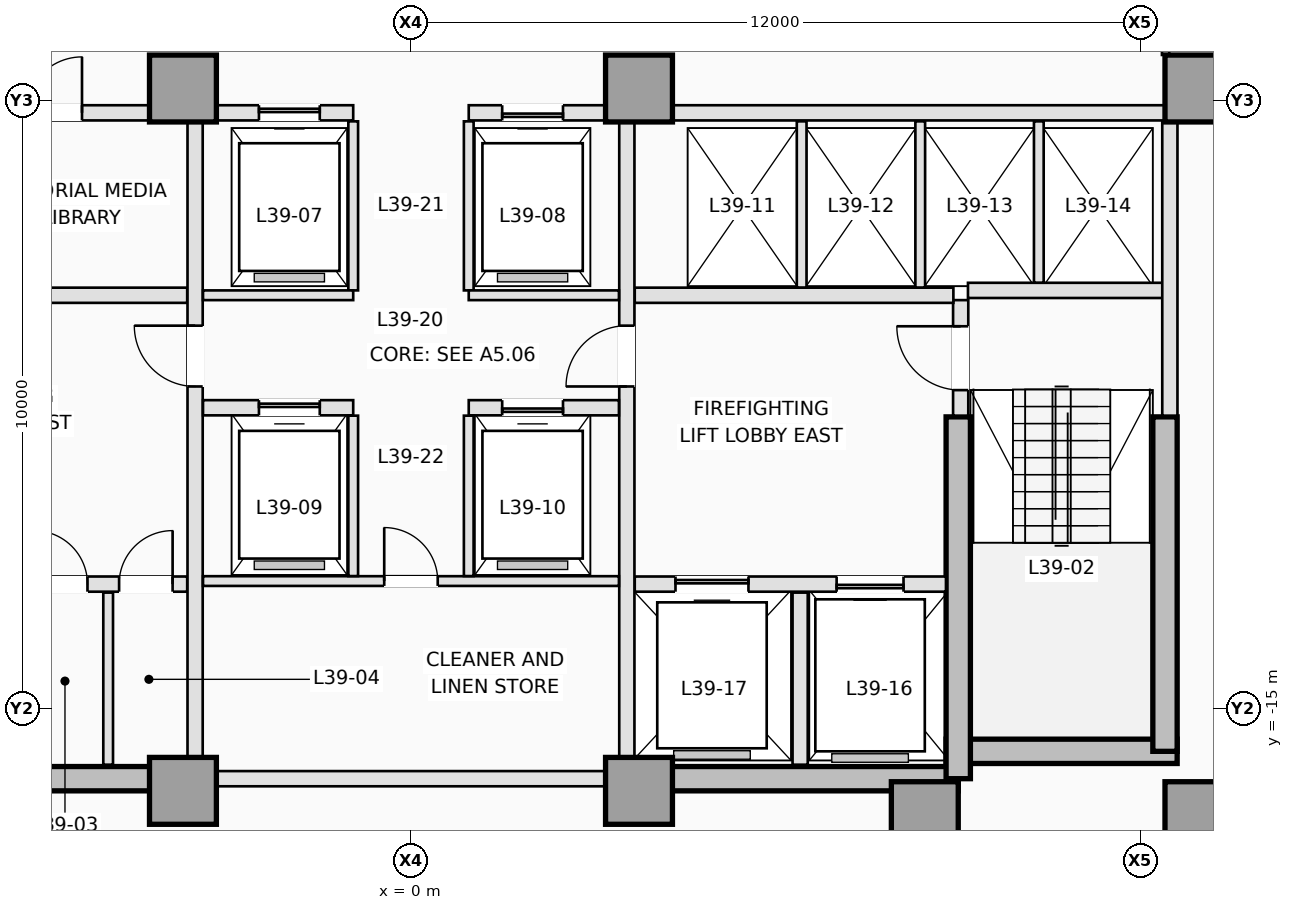
"""IFC4 building model, lengths in metres.
Left out: names, types, materials, properties, quantities, classifications, styles, units other than length and angle.
Written with IfcOpenShell. Run it as: python <this file> out.ifc"""

import sys

from ifc_helpers import new_model, si_unit, direction, frame, frame_2d, origin, origin_2d, place, context, subcontext, project, spatial, rectangle, extrude, element, fill, save


model = new_model("IFC4")
c1 = context("Model", 3, precision=1e-05, world=origin(), true_north=direction((0.0, 1.0)))
c2 = subcontext(c1, "Body", "Model", "MODEL_VIEW")
j1 = project(units=[si_unit("LENGTHUNIT", "METRE"), si_unit("PLANEANGLEUNIT", "RADIAN")], contexts=[c1])
p1 = place(None, origin())
s1 = spatial("IfcSite", under=j1, at=p1, CompositionType="ELEMENT")
p2 = place(p1, origin())
s2 = spatial("IfcBuilding", under=s1, at=p2, CompositionType="ELEMENT")
p3 = place(p2, frame((0.0, 0.0, 144.0)))
s3 = spatial("IfcBuildingStorey", under=s2, at=p3, CompositionType="ELEMENT", Elevation=144.0)
for number, where, z_axis, x_axis in (
    (1, (-9.0, -16.15, 0.0), (0.0, 0.0, 1.0), (1.0, 0.0, 0.0)),
    (2, (3.75, -16.15, 0.0), (0.0, 0.0, 1.0), (1.0, 0.0, 0.0)),
):
    element("IfcWall", number, at=place(p3, frame(where, z_axis=z_axis, x_axis=x_axis)), inside=s3, PredefinedType="SHEAR", context=c2, shape_type="SweptSolid", body=[
        extrude(rectangle(XDim=5.25, YDim=0.4, at=frame_2d((2.625, 0.0))), origin(), (0.0, 0.0, 1.0), 3.5),
    ])
p4 = place(p3, frame((8.8, -15.7, 0.0), z_axis=(0.0, 0.0, 1.0), x_axis=(1.0, 0.0, 0.0)))
e3 = element("IfcWall", 3, at=p4, inside=s3, PredefinedType="SHEAR", context=c2, shape_type="SweptSolid", body=[
    extrude(rectangle(XDim=3.8, YDim=0.4, at=frame_2d((1.9, 0.0))), origin(), (0.0, 0.0, 1.0), 3.5),
])
p5 = place(p3, frame((12.4, -15.7, 0.0), z_axis=(0.0, 0.0, 1.0), x_axis=(0.0, 1.0, 0.0)))
e4 = element("IfcWall", 4, at=p5, inside=s3, PredefinedType="SHEAR", context=c2, shape_type="SweptSolid", body=[
    extrude(rectangle(XDim=5.5, YDim=0.4, at=frame_2d((2.75, 0.0))), origin(), (0.0, 0.0, 1.0), 3.5),
])
p6 = place(p3, frame((9.0, -16.15, 0.0), z_axis=(0.0, 0.0, 1.0), x_axis=(0.0, 1.0, 0.0)))
e5 = element("IfcWall", 5, at=p6, inside=s3, PredefinedType="SHEAR", context=c2, shape_type="SweptSolid", body=[
    extrude(rectangle(XDim=5.95, YDim=0.4, at=frame_2d((2.975, 0.0))), origin(), (0.0, 0.0, 1.0), 3.5),
])
for number, where, z_axis, x_axis in (
    (6, (-3.75, -16.35, 0.0), (0.0, 0.0, 1.0), (1.0, 0.0, 0.0)),
    (7, (3.75, -16.35, 0.0), (0.0, 0.0, 1.0), (1.0, 0.0, 0.0)),
    (8, (8.45, -16.75, 0.0), (0.0, 0.0, 1.0), (1.0, 0.0, 0.0)),
    (9, (12.95, -16.75, 0.0), (0.0, 0.0, 1.0), (1.0, 0.0, 0.0)),
    (10, (-3.75, -4.8, 0.0), (0.0, 0.0, 1.0), (1.0, 0.0, 0.0)),
    (11, (3.75, -4.8, 0.0), (0.0, 0.0, 1.0), (1.0, 0.0, 0.0)),
    (12, (12.95, -4.8, 0.0), (0.0, 0.0, 1.0), (1.0, 0.0, 0.0)),
):
    element("IfcColumn", number, at=place(p3, frame(where, z_axis=z_axis, x_axis=x_axis)), inside=s3, PredefinedType="COLUMN", context=c2, shape_type="SweptSolid", body=[
        extrude(rectangle(XDim=1.1, YDim=1.1, at=origin_2d()), origin(), (0.0, 0.0, 1.0), 3.5),
    ])
p7 = place(p3, frame((9.04, -10.18, 0.0), z_axis=(0.0, 0.0, 1.0), x_axis=(0.0, 1.0, 0.0)))
e13 = element("IfcWall", 13, at=p7, inside=s3, PredefinedType="PARTITIONING", context=c2, shape_type="SweptSolid", body=[
    extrude(rectangle(XDim=1.9, YDim=0.25, at=frame_2d((0.95, 0.0))), origin(), (0.0, 0.0, 1.0), 3.25),
])
p8 = place(p7, frame((0.42, 0.0, 0.0)))
e14 = element("IfcOpeningElement", 14, at=p8, cuts=e13, PredefinedType="OPENING", context=c2, shape_type="SweptSolid", body=[
    extrude(rectangle(XDim=1.05, YDim=2.15, at=frame_2d((0.525, 1.075))), frame((0.0, 0.135, 0.0), z_axis=(0.0, -1.0, 0.0), x_axis=(1.0, 0.0, 0.0)), (0.0, 0.0, 1.0), 0.27),
])
p9 = place(p3, frame((9.16, -8.12, 0.0), z_axis=(0.0, 0.0, 1.0), x_axis=(1.0, 0.0, 0.0)))
e15 = element("IfcWall", 15, at=p9, inside=s3, PredefinedType="PARTITIONING", context=c2, shape_type="SweptSolid", body=[
    extrude(rectangle(XDim=3.22, YDim=0.25, at=frame_2d((1.61, 0.0))), origin(), (0.0, 0.0, 1.0), 3.25),
])
p10 = place(p3, frame((12.48, -10.18, 0.0), z_axis=(0.0, 0.0, 1.0), x_axis=(0.0, 1.0, 0.0)))
e16 = element("IfcWall", 16, at=p10, inside=s3, PredefinedType="PARTITIONING", context=c2, shape_type="SweptSolid", body=[
    extrude(rectangle(XDim=4.828, YDim=0.25, at=frame_2d((2.414, 0.0))), origin(), (0.0, 0.0, 1.0), 3.25),
])
p11 = place(p3, frame((-8.798, -12.95, 0.0), z_axis=(0.0, 0.0, 1.0), x_axis=(1.0, 0.0, 0.0)))
e17 = element("IfcWall", 17, at=p11, inside=s3, PredefinedType="PARTITIONING", context=c2, shape_type="SweptSolid", body=[
    extrude(rectangle(XDim=5.118, YDim=0.25, at=frame_2d((2.559, 0.0))), origin(), (0.0, 0.0, 1.0), 3.25),
])
p12 = place(p11, frame((0.698, 0.0, 0.0)))
e18 = element("IfcOpeningElement", 18, at=p12, cuts=e17, PredefinedType="OPENING", context=c2, shape_type="SweptSolid", body=[
    extrude(rectangle(XDim=1.1, YDim=2.15, at=frame_2d((0.55, 1.075))), frame((0.0, 0.135, 0.0), z_axis=(0.0, -1.0, 0.0), x_axis=(1.0, 0.0, 0.0)), (0.0, 0.0, 1.0), 0.27),
])
p13 = place(p11, frame((2.598, 0.0, 0.0)))
e19 = element("IfcOpeningElement", 19, at=p13, cuts=e17, PredefinedType="OPENING", context=c2, shape_type="SweptSolid", body=[
    extrude(rectangle(XDim=0.88, YDim=2.1, at=frame_2d((0.44, 1.05))), frame((0.0, 0.135, 0.0), z_axis=(0.0, -1.0, 0.0), x_axis=(1.0, 0.0, 0.0)), (0.0, 0.0, 1.0), 0.27),
])
p14 = place(p11, frame((3.998, 0.0, 0.0)))
e20 = element("IfcOpeningElement", 20, at=p14, cuts=e17, PredefinedType="OPENING", context=c2, shape_type="SweptSolid", body=[
    extrude(rectangle(XDim=0.88, YDim=2.1, at=frame_2d((0.44, 1.05))), frame((0.0, 0.135, 0.0), z_axis=(0.0, -1.0, 0.0), x_axis=(1.0, 0.0, 0.0)), (0.0, 0.0, 1.0), 0.27),
])
p15 = place(p3, frame((3.68, -12.95, 0.0), z_axis=(0.0, 0.0, 1.0), x_axis=(1.0, 0.0, 0.0)))
e21 = element("IfcWall", 21, at=p15, inside=s3, PredefinedType="PARTITIONING", context=c2, shape_type="SweptSolid", body=[
    extrude(rectangle(XDim=5.118, YDim=0.25, at=frame_2d((2.559, 0.0))), origin(), (0.0, 0.0, 1.0), 3.25),
])
p16 = place(p15, frame((3.32, 0.0, 0.0)))
e22 = element("IfcOpeningElement", 22, at=p16, cuts=e21, PredefinedType="OPENING", context=c2, shape_type="SweptSolid", body=[
    extrude(rectangle(XDim=1.1, YDim=2.15, at=frame_2d((0.55, 1.075))), frame((0.0, 0.135, 0.0), z_axis=(0.0, -1.0, 0.0), x_axis=(1.0, 0.0, 0.0)), (0.0, 0.0, 1.0), 0.27),
])
p17 = place(p15, frame((0.67, 0.0, 0.0)))
e23 = element("IfcOpeningElement", 23, at=p17, cuts=e21, PredefinedType="OPENING", context=c2, shape_type="SweptSolid", body=[
    extrude(rectangle(XDim=1.2, YDim=2.15, at=frame_2d((0.6, 1.075))), frame((0.0, 0.135, 0.0), z_axis=(0.0, -1.0, 0.0), x_axis=(1.0, 0.0, 0.0)), (0.0, 0.0, 1.0), 0.27),
])
p18 = place(p3, frame((-4.98, -15.92, 0.0), z_axis=(0.0, 0.0, 1.0), x_axis=(0.0, 1.0, 0.0)))
e24 = element("IfcWall", 24, at=p18, inside=s3, PredefinedType="PARTITIONING", context=c2, shape_type="SweptSolid", body=[
    extrude(rectangle(XDim=2.83, YDim=0.16, at=frame_2d((1.415, 0.0))), origin(), (0.0, 0.0, 1.0), 3.25),
])
p19 = place(p3, frame((6.4, -15.92, 0.0), z_axis=(0.0, 0.0, 1.0), x_axis=(0.0, 1.0, 0.0)))
e25 = element("IfcWall", 25, at=p19, inside=s3, PredefinedType="PARTITIONING", context=c2, shape_type="SweptSolid", body=[
    extrude(rectangle(XDim=2.83, YDim=0.25, at=frame_2d((1.415, 0.0))), origin(), (0.0, 0.0, 1.0), 3.25),
])
for number, where, z_axis, x_axis in (
    (26, (-8.92, -8.2, 0.0), (0.0, 0.0, 1.0), (1.0, 0.0, 0.0)),
    (27, (3.68, -8.2, 0.0), (0.0, 0.0, 1.0), (1.0, 0.0, 0.0)),
):
    element("IfcWall", number, at=place(p3, frame(where, z_axis=z_axis, x_axis=x_axis)), inside=s3, PredefinedType="PARTITIONING", context=c2, shape_type="SweptSolid", body=[
        extrude(rectangle(XDim=5.24, YDim=0.25, at=frame_2d((2.62, 0.0))), origin(), (0.0, 0.0, 1.0), 3.25),
    ])
p20 = place(p3, frame((-3.55, -15.798, 0.0), z_axis=(0.0, 0.0, 1.0), x_axis=(0.0, 1.0, 0.0)))
e28 = element("IfcWall", 28, at=p20, inside=s3, PredefinedType="PARTITIONING", context=c2, shape_type="SweptSolid", body=[
    extrude(rectangle(XDim=10.446, YDim=0.25, at=frame_2d((5.223, 0.0))), origin(), (0.0, 0.0, 1.0), 3.25),
])
p21 = place(p20, frame((6.098, 0.0, 0.0)))
e29 = element("IfcOpeningElement", 29, at=p21, cuts=e28, PredefinedType="OPENING", context=c2, shape_type="SweptSolid", body=[
    extrude(rectangle(XDim=1.0, YDim=2.15, at=frame_2d((0.5, 1.075))), frame((0.0, 0.135, 0.0), z_axis=(0.0, -1.0, 0.0), x_axis=(1.0, 0.0, 0.0)), (0.0, 0.0, 1.0), 0.27),
])
p22 = place(p3, frame((3.55, -15.798, 0.0), z_axis=(0.0, 0.0, 1.0), x_axis=(0.0, 1.0, 0.0)))
e30 = element("IfcWall", 30, at=p22, inside=s3, PredefinedType="PARTITIONING", context=c2, shape_type="SweptSolid", body=[
    extrude(rectangle(XDim=10.446, YDim=0.25, at=frame_2d((5.223, 0.0))), origin(), (0.0, 0.0, 1.0), 3.25),
])
p23 = place(p22, frame((6.098, 0.0, 0.0)))
e31 = element("IfcOpeningElement", 31, at=p23, cuts=e30, PredefinedType="OPENING", context=c2, shape_type="SweptSolid", body=[
    extrude(rectangle(XDim=1.0, YDim=2.15, at=frame_2d((0.5, 1.075))), frame((0.0, 0.135, 0.0), z_axis=(0.0, -1.0, 0.0), x_axis=(1.0, 0.0, 0.0)), (0.0, 0.0, 1.0), 0.27),
])
p24 = place(p3, frame((-12.398, -5.2, 0.0), z_axis=(0.0, 0.0, 1.0), x_axis=(1.0, 0.0, 0.0)))
e32 = element("IfcWall", 32, at=p24, inside=s3, PredefinedType="PARTITIONING", context=c2, shape_type="SweptSolid", body=[
    extrude(rectangle(XDim=8.096, YDim=0.25, at=frame_2d((4.048, 0.0))), origin(), (0.0, 0.0, 1.0), 3.25),
])
p25 = place(p24, frame((2.968, 0.0, 0.0)))
e33 = element("IfcOpeningElement", 33, at=p25, cuts=e32, PredefinedType="OPENING", context=c2, shape_type="SweptSolid", body=[
    extrude(rectangle(XDim=0.92, YDim=2.12, at=frame_2d((0.46, 1.06))), frame((0.0, 0.135, 0.0), z_axis=(0.0, -1.0, 0.0), x_axis=(1.0, 0.0, 0.0)), (0.0, 0.0, 1.0), 0.27),
])
p26 = place(p24, frame((6.068, 0.0, 0.0)))
e34 = element("IfcOpeningElement", 34, at=p26, cuts=e32, PredefinedType="OPENING", context=c2, shape_type="SweptSolid", body=[
    extrude(rectangle(XDim=0.92, YDim=2.12, at=frame_2d((0.46, 1.06))), frame((0.0, 0.135, 0.0), z_axis=(0.0, -1.0, 0.0), x_axis=(1.0, 0.0, 0.0)), (0.0, 0.0, 1.0), 0.27),
])
p27 = place(p3, frame((4.302, -5.2, 0.0), z_axis=(0.0, 0.0, 1.0), x_axis=(1.0, 0.0, 0.0)))
e35 = element("IfcWall", 35, at=p27, inside=s3, PredefinedType="PARTITIONING", context=c2, shape_type="SweptSolid", body=[
    extrude(rectangle(XDim=8.096, YDim=0.25, at=frame_2d((4.048, 0.0))), origin(), (0.0, 0.0, 1.0), 3.25),
])
p28 = place(p3, frame((-3.198, -5.2, 0.0), z_axis=(0.0, 0.0, 1.0), x_axis=(1.0, 0.0, 0.0)))
e36 = element("IfcWall", 36, at=p28, inside=s3, PredefinedType="PARTITIONING", context=c2, shape_type="SweptSolid", body=[
    extrude(rectangle(XDim=2.248, YDim=0.25, at=frame_2d((1.124, 0.0))), origin(), (0.0, 0.0, 1.0), 3.25),
])
p29 = place(p28, frame((0.698, 0.0, 0.0)))
e37 = element("IfcOpeningElement", 37, at=p29, cuts=e36, PredefinedType="OPENING", context=c2, shape_type="SweptSolid", body=[
    extrude(rectangle(XDim=1.0, YDim=2.15, at=frame_2d((0.5, 1.075))), frame((0.0, 0.135, 0.0), z_axis=(0.0, -1.0, 0.0), x_axis=(1.0, 0.0, 0.0)), (0.0, 0.0, 1.0), 0.27),
])
p30 = place(p3, frame((0.95, -5.2, 0.0), z_axis=(0.0, 0.0, 1.0), x_axis=(1.0, 0.0, 0.0)))
e38 = element("IfcWall", 38, at=p30, inside=s3, PredefinedType="PARTITIONING", context=c2, shape_type="SweptSolid", body=[
    extrude(rectangle(XDim=2.248, YDim=0.25, at=frame_2d((1.124, 0.0))), origin(), (0.0, 0.0, 1.0), 3.25),
])
p31 = place(p30, frame((0.55, 0.0, 0.0)))
e39 = element("IfcOpeningElement", 39, at=p31, cuts=e38, PredefinedType="OPENING", context=c2, shape_type="SweptSolid", body=[
    extrude(rectangle(XDim=1.0, YDim=2.15, at=frame_2d((0.5, 1.075))), frame((0.0, 0.135, 0.0), z_axis=(0.0, -1.0, 0.0), x_axis=(1.0, 0.0, 0.0)), (0.0, 0.0, 1.0), 0.27),
])
for number, where, z_axis, x_axis in (
    (40, (6.425, -8.073, 0.0), (0.0, 0.0, 1.0), (0.0, 1.0, 0.0)),
    (41, (8.375, -8.073, 0.0), (0.0, 0.0, 1.0), (0.0, 1.0, 0.0)),
):
    element("IfcWall", number, at=place(p3, frame(where, z_axis=z_axis, x_axis=x_axis)), inside=s3, PredefinedType="PARTITIONING", context=c2, shape_type="SweptSolid", body=[
        extrude(rectangle(XDim=2.733, YDim=0.16, at=frame_2d((1.366, 0.0))), origin(), (0.0, 0.0, 1.0), 3.25),
    ])
p32 = place(p3, frame((10.325, -7.993, 0.0), z_axis=(0.0, 0.0, 1.0), x_axis=(0.0, 1.0, 0.0)))
e42 = element("IfcWall", 42, at=p32, inside=s3, PredefinedType="PARTITIONING", context=c2, shape_type="SweptSolid", body=[
    extrude(rectangle(XDim=2.653, YDim=0.16, at=frame_2d((1.326, 0.0))), origin(), (0.0, 0.0, 1.0), 3.25),
])
p33 = place(p3, frame((-3.198, -16.15, 0.0), z_axis=(0.0, 0.0, 1.0), x_axis=(1.0, 0.0, 0.0)))
e43 = element("IfcWall", 43, at=p33, inside=s3, PredefinedType="PARTITIONING", context=c2, shape_type="SweptSolid", body=[
    extrude(rectangle(XDim=6.396, YDim=0.25, at=frame_2d((3.198, 0.0))), origin(), (0.0, 0.0, 1.0), 2.45),
])
for number, where, z_axis, x_axis in (
    (44, (-0.95, -8.12, 0.0), (0.0, 0.0, 1.0), (0.0, 1.0, 0.0)),
    (45, (0.95, -8.12, 0.0), (0.0, 0.0, 1.0), (0.0, 1.0, 0.0)),
):
    element("IfcWall", number, at=place(p3, frame(where, z_axis=z_axis, x_axis=x_axis)), inside=s3, PredefinedType="PARTITIONING", context=c2, shape_type="SweptSolid", body=[
        extrude(rectangle(XDim=2.78, YDim=0.16, at=frame_2d((1.39, 0.0))), origin(), (0.0, 0.0, 1.0), 3.25),
    ])
for number, where, z_axis, x_axis in (
    (46, (-3.42, -8.2, 0.0), (0.0, 0.0, 1.0), (1.0, 0.0, 0.0)),
    (47, (0.95, -8.2, 0.0), (0.0, 0.0, 1.0), (1.0, 0.0, 0.0)),
):
    element("IfcWall", number, at=place(p3, frame(where, z_axis=z_axis, x_axis=x_axis)), inside=s3, PredefinedType="PARTITIONING", context=c2, shape_type="SweptSolid", body=[
        extrude(rectangle(XDim=2.47, YDim=0.16, at=frame_2d((1.235, 0.0))), origin(), (0.0, 0.0, 1.0), 3.25),
    ])
p34 = place(p3, frame((-3.42, -10.05, 0.0), z_axis=(0.0, 0.0, 1.0), x_axis=(1.0, 0.0, 0.0)))
e48 = element("IfcWall", 48, at=p34, inside=s3, PredefinedType="PARTITIONING", context=c2, shape_type="SweptSolid", body=[
    extrude(rectangle(XDim=2.47, YDim=0.25, at=frame_2d((1.235, 0.0))), origin(), (0.0, 0.0, 1.0), 3.25),
])
p35 = place(p34, frame((0.92, 0.0, 0.0)))
e49 = element("IfcOpeningElement", 49, at=p35, cuts=e48, PredefinedType="OPENING", context=c2, shape_type="SweptSolid", body=[
    extrude(rectangle(XDim=1.0, YDim=2.15, at=frame_2d((0.5, 1.075))), frame((0.0, 0.135, 0.0), z_axis=(0.0, -1.0, 0.0), x_axis=(1.0, 0.0, 0.0)), (0.0, 0.0, 1.0), 0.27),
])
p36 = place(p3, frame((0.95, -10.05, 0.0), z_axis=(0.0, 0.0, 1.0), x_axis=(1.0, 0.0, 0.0)))
e50 = element("IfcWall", 50, at=p36, inside=s3, PredefinedType="PARTITIONING", context=c2, shape_type="SweptSolid", body=[
    extrude(rectangle(XDim=2.47, YDim=0.25, at=frame_2d((1.235, 0.0))), origin(), (0.0, 0.0, 1.0), 3.25),
])
p37 = place(p36, frame((0.55, 0.0, 0.0)))
e51 = element("IfcOpeningElement", 51, at=p37, cuts=e50, PredefinedType="OPENING", context=c2, shape_type="SweptSolid", body=[
    extrude(rectangle(XDim=1.0, YDim=2.15, at=frame_2d((0.5, 1.075))), frame((0.0, 0.135, 0.0), z_axis=(0.0, -1.0, 0.0), x_axis=(1.0, 0.0, 0.0)), (0.0, 0.0, 1.0), 0.27),
])
p38 = place(p3, frame((-3.42, -12.9, 0.0), z_axis=(0.0, 0.0, 1.0), x_axis=(1.0, 0.0, 0.0)))
e52 = element("IfcWall", 52, at=p38, inside=s3, PredefinedType="PARTITIONING", context=c2, shape_type="SweptSolid", body=[
    extrude(rectangle(XDim=6.84, YDim=0.16, at=frame_2d((3.42, 0.0))), origin(), (0.0, 0.0, 1.0), 3.25),
])
p39 = place(p38, frame((2.98, 0.0, 0.0)))
e53 = element("IfcOpeningElement", 53, at=p39, cuts=e52, PredefinedType="OPENING", context=c2, shape_type="SweptSolid", body=[
    extrude(rectangle(XDim=0.88, YDim=2.12, at=frame_2d((0.44, 1.06))), frame((0.0, 0.09, 0.0), z_axis=(0.0, -1.0, 0.0), x_axis=(1.0, 0.0, 0.0)), (0.0, 0.0, 1.0), 0.18),
])
for number, where, z_axis, x_axis in (
    (54, (-0.95, -12.818, 0.0), (0.0, 0.0, 1.0), (0.0, 1.0, 0.0)),
    (55, (0.95, -12.818, 0.0), (0.0, 0.0, 1.0), (0.0, 1.0, 0.0)),
):
    element("IfcWall", number, at=place(p3, frame(where, z_axis=z_axis, x_axis=x_axis)), inside=s3, PredefinedType="PARTITIONING", context=c2, shape_type="SweptSolid", body=[
        extrude(rectangle(XDim=2.638, YDim=0.16, at=frame_2d((1.319, 0.0))), origin(), (0.0, 0.0, 1.0), 3.25),
    ])
p40 = place(p3, frame((12.41, -2.462, 0.0), z_axis=(0.0, 0.0, 1.0), x_axis=(0.0, -1.0, 0.0)))
e56 = element("IfcWall", 56, at=p40, inside=s3, PredefinedType="PARTITIONING", context=c2, shape_type="SweptSolid", body=[
    extrude(rectangle(XDim=1.786, YDim=0.12, at=frame_2d((0.893, 0.0))), origin(), (0.0, 0.0, 1.0), 3.25),
])
p41 = place(p29, origin())
e57 = element("IfcDoor", 57, at=p41, inside=s3, OperationType="SLIDING_TO_LEFT", PredefinedType="DOOR", context=c2, shape_type="SweptSolid", body=[
    extrude(rectangle(XDim=1.0, YDim=2.15, at=frame_2d((0.5, 1.075))), frame((0.0, 0.025, 0.0), z_axis=(0.0, -1.0, 0.0), x_axis=(1.0, 0.0, 0.0)), (0.0, 0.0, 1.0), 0.05),
])
fill(e37, e57)
p42 = place(p31, origin())
e58 = element("IfcDoor", 58, at=p42, inside=s3, OperationType="SLIDING_TO_RIGHT", PredefinedType="DOOR", context=c2, shape_type="SweptSolid", body=[
    extrude(rectangle(XDim=1.0, YDim=2.15, at=frame_2d((0.5, 1.075))), frame((0.0, 0.025, 0.0), z_axis=(0.0, -1.0, 0.0), x_axis=(1.0, 0.0, 0.0)), (0.0, 0.0, 1.0), 0.05),
])
fill(e39, e58)
p43 = place(p16, origin())
e59 = element("IfcDoor", 59, at=p43, inside=s3, OperationType="SLIDING_TO_RIGHT", PredefinedType="DOOR", context=c2, shape_type="SweptSolid", body=[
    extrude(rectangle(XDim=1.1, YDim=2.15, at=frame_2d((0.55, 1.075))), frame((0.0, 0.025, 0.0), z_axis=(0.0, -1.0, 0.0), x_axis=(1.0, 0.0, 0.0)), (0.0, 0.0, 1.0), 0.05),
])
fill(e22, e59)
p44 = place(p17, origin())
e60 = element("IfcDoor", 60, at=p44, inside=s3, OperationType="SLIDING_TO_LEFT", PredefinedType="DOOR", context=c2, shape_type="SweptSolid", body=[
    extrude(rectangle(XDim=1.2, YDim=2.15, at=frame_2d((0.6, 1.075))), frame((0.0, 0.025, 0.0), z_axis=(0.0, -1.0, 0.0), x_axis=(1.0, 0.0, 0.0)), (0.0, 0.0, 1.0), 0.05),
])
fill(e23, e60)
p45 = place(p35, origin())
e61 = element("IfcDoor", 61, at=p45, inside=s3, OperationType="SLIDING_TO_LEFT", PredefinedType="DOOR", context=c2, shape_type="SweptSolid", body=[
    extrude(rectangle(XDim=1.0, YDim=2.15, at=frame_2d((0.5, 1.075))), frame((0.0, 0.025, 0.0), z_axis=(0.0, -1.0, 0.0), x_axis=(1.0, 0.0, 0.0)), (0.0, 0.0, 1.0), 0.05),
])
fill(e49, e61)
p46 = place(p37, origin())
e62 = element("IfcDoor", 62, at=p46, inside=s3, OperationType="SLIDING_TO_RIGHT", PredefinedType="DOOR", context=c2, shape_type="SweptSolid", body=[
    extrude(rectangle(XDim=1.0, YDim=2.15, at=frame_2d((0.5, 1.075))), frame((0.0, 0.025, 0.0), z_axis=(0.0, -1.0, 0.0), x_axis=(1.0, 0.0, 0.0)), (0.0, 0.0, 1.0), 0.05),
])
fill(e51, e62)
p47 = place(p8, origin())
e63 = element("IfcDoor", 63, at=p47, inside=s3, OperationType="SINGLE_SWING_RIGHT", PredefinedType="DOOR", context=c2, shape_type="SweptSolid", body=[
    extrude(rectangle(XDim=1.05, YDim=2.15, at=frame_2d((0.525, 1.075))), frame((0.0, 0.025, 0.0), z_axis=(0.0, -1.0, 0.0), x_axis=(1.0, 0.0, 0.0)), (0.0, 0.0, 1.0), 0.05),
])
fill(e14, e63)
p48 = place(p13, origin())
e64 = element("IfcDoor", 64, at=p48, inside=s3, OperationType="SINGLE_SWING_LEFT", PredefinedType="TRAPDOOR", context=c2, shape_type="SweptSolid", body=[
    extrude(rectangle(XDim=0.88, YDim=2.1, at=frame_2d((0.44, 1.05))), frame((0.0, 0.025, 0.0), z_axis=(0.0, -1.0, 0.0), x_axis=(1.0, 0.0, 0.0)), (0.0, 0.0, 1.0), 0.05),
])
fill(e19, e64)
p49 = place(p14, origin())
e65 = element("IfcDoor", 65, at=p49, inside=s3, OperationType="SINGLE_SWING_RIGHT", PredefinedType="TRAPDOOR", context=c2, shape_type="SweptSolid", body=[
    extrude(rectangle(XDim=0.88, YDim=2.1, at=frame_2d((0.44, 1.05))), frame((0.0, 0.025, 0.0), z_axis=(0.0, -1.0, 0.0), x_axis=(1.0, 0.0, 0.0)), (0.0, 0.0, 1.0), 0.05),
])
fill(e20, e65)
p50 = place(p21, origin())
e66 = element("IfcDoor", 66, at=p50, inside=s3, OperationType="SINGLE_SWING_RIGHT", PredefinedType="DOOR", context=c2, shape_type="SweptSolid", body=[
    extrude(rectangle(XDim=1.0, YDim=2.15, at=frame_2d((0.5, 1.075))), frame((0.0, 0.025, 0.0), z_axis=(0.0, -1.0, 0.0), x_axis=(1.0, 0.0, 0.0)), (0.0, 0.0, 1.0), 0.05),
])
fill(e29, e66)
p51 = place(p23, origin())
e67 = element("IfcDoor", 67, at=p51, inside=s3, OperationType="SINGLE_SWING_LEFT", PredefinedType="DOOR", context=c2, shape_type="SweptSolid", body=[
    extrude(rectangle(XDim=1.0, YDim=2.15, at=frame_2d((0.5, 1.075))), frame((0.0, 0.025, 0.0), z_axis=(0.0, -1.0, 0.0), x_axis=(1.0, 0.0, 0.0)), (0.0, 0.0, 1.0), 0.05),
])
fill(e31, e67)
p52 = place(p26, origin())
e68 = element("IfcDoor", 68, at=p52, inside=s3, OperationType="SINGLE_SWING_RIGHT", PredefinedType="DOOR", context=c2, shape_type="SweptSolid", body=[
    extrude(rectangle(XDim=0.92, YDim=2.12, at=frame_2d((0.46, 1.06))), frame((0.0, 0.025, 0.0), z_axis=(0.0, -1.0, 0.0), x_axis=(1.0, 0.0, 0.0)), (0.0, 0.0, 1.0), 0.05),
])
fill(e34, e68)
p53 = place(p39, origin())
e69 = element("IfcDoor", 69, at=p53, inside=s3, OperationType="SINGLE_SWING_LEFT", PredefinedType="DOOR", context=c2, shape_type="SweptSolid", body=[
    extrude(rectangle(XDim=0.88, YDim=2.12, at=frame_2d((0.44, 1.06))), frame((0.0, 0.025, 0.0), z_axis=(0.0, -1.0, 0.0), x_axis=(1.0, 0.0, 0.0)), (0.0, 0.0, 1.0), 0.05),
])
fill(e53, e69)
save(model, sys.argv[1])
